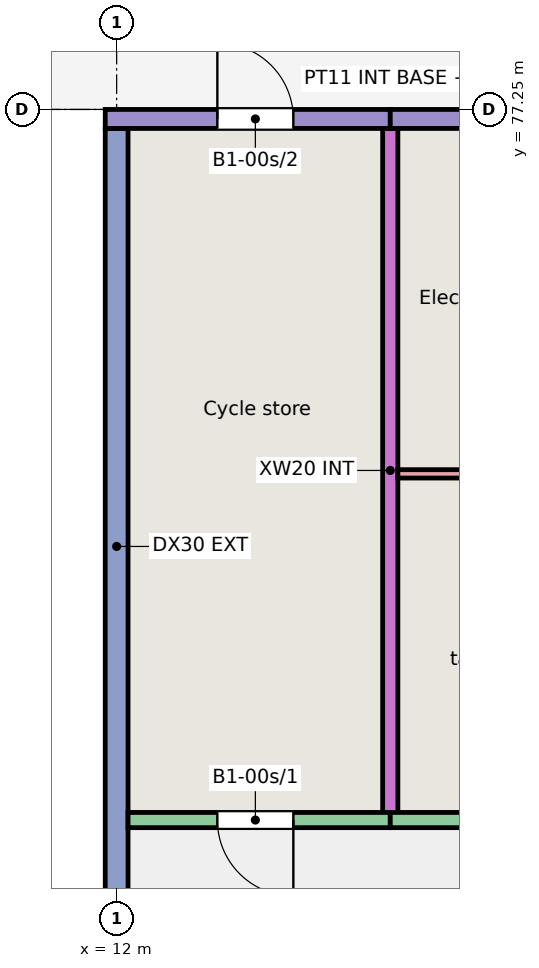
"""IFC4 building model, lengths in metres.
Left out: names, types, materials, properties, quantities, classifications, styles, units other than length and angle.
Written with IfcOpenShell. Run it as: python <this file> out.ifc"""

import sys

from ifc_helpers import new_model, si_unit, direction, frame, frame_2d, origin, place, context, subcontext, project, spatial, rectangle, extrude, element, fill, save


model = new_model("IFC4")
c1 = context("Model", 3, precision=1e-05, world=origin(), true_north=direction((0.0, 1.0)))
c2 = subcontext(c1, "Body", "Model", "MODEL_VIEW")
j1 = project(units=[si_unit("LENGTHUNIT", "METRE"), si_unit("PLANEANGLEUNIT", "RADIAN")], contexts=[c1])
p1 = place(None, origin())
s1 = spatial("IfcSite", under=j1, at=p1, CompositionType="ELEMENT")
p2 = place(p1, origin())
s2 = spatial("IfcBuilding", under=s1, at=p2, CompositionType="ELEMENT")
p3 = place(p2, origin())
s3 = spatial("IfcBuildingStorey", under=s2, at=p3, CompositionType="ELEMENT", Elevation=0.0)
p4 = place(p3, frame((12.0, 66.0, -0.25), z_axis=(0.0, 0.0, 1.0), x_axis=(0.0, 1.0, 0.0)))
e1 = element("IfcWall", 1, at=p4, inside=s3, PredefinedType="SHEAR", context=c2, shape_type="SweptSolid", body=[
    extrude(rectangle(XDim=11.0, YDim=0.3, at=frame_2d((5.5, 0.0))), origin(), (0.0, 0.0, 1.0), 3.25),
])
p5 = place(p3, frame((15.6, 68.0, -0.25), z_axis=(0.0, 0.0, 1.0), x_axis=(0.0, 1.0, 0.0)))
e2 = element("IfcWall", 2, at=p5, inside=s3, PredefinedType="SHEAR", context=c2, shape_type="SweptSolid", body=[
    extrude(rectangle(XDim=9.0, YDim=0.2, at=frame_2d((4.5, 0.0))), origin(), (0.0, 0.0, 1.0), 3.25),
])
p6 = place(p3, frame((11.85, 77.125, -0.25), z_axis=(0.0, 0.0, 1.0), x_axis=(1.0, 0.0, 0.0)))
e3 = element("IfcWall", 3, at=p6, inside=s3, PredefinedType="SOLIDWALL", context=c2, shape_type="SweptSolid", body=[
    extrude(rectangle(XDim=3.75, YDim=0.25, at=frame_2d((1.875, 0.0))), origin(), (0.0, 0.0, 1.0), 3.25),
])
p7 = place(p6, frame((1.475, 0.0, 0.25)))
e4 = element("IfcOpeningElement", 4, at=p7, cuts=e3, PredefinedType="OPENING", context=c2, shape_type="SweptSolid", body=[
    extrude(rectangle(XDim=1.0, YDim=2.1, at=frame_2d((0.5, 1.05))), frame((0.0, 0.135, 0.0), z_axis=(0.0, -1.0, 0.0), x_axis=(1.0, 0.0, 0.0)), (0.0, 0.0, 1.0), 0.27),
])
p8 = place(p3, frame((12.15, 67.9, -0.25), z_axis=(0.0, 0.0, 1.0), x_axis=(1.0, 0.0, 0.0)))
e5 = element("IfcWall", 5, at=p8, inside=s3, PredefinedType="SOLIDWALL", context=c2, shape_type="SweptSolid", body=[
    extrude(rectangle(XDim=3.45, YDim=0.2, at=frame_2d((1.725, 0.0))), origin(), (0.0, 0.0, 1.0), 3.25),
])
p9 = place(p8, frame((1.175, 0.0, 0.25)))
e6 = element("IfcOpeningElement", 6, at=p9, cuts=e5, PredefinedType="OPENING", context=c2, shape_type="SweptSolid", body=[
    extrude(rectangle(XDim=1.0, YDim=2.1, at=frame_2d((0.5, 1.05))), frame((0.0, 0.11, 0.0), z_axis=(0.0, -1.0, 0.0), x_axis=(1.0, 0.0, 0.0)), (0.0, 0.0, 1.0), 0.22),
])
p10 = place(p3, frame((15.6, 77.125, -0.25), z_axis=(0.0, 0.0, 1.0), x_axis=(1.0, 0.0, 0.0)))
e7 = element("IfcWall", 7, at=p10, inside=s3, PredefinedType="SOLIDWALL", context=c2, shape_type="SweptSolid", body=[
    extrude(rectangle(XDim=3.6, YDim=0.25, at=frame_2d((1.8, 0.0))), origin(), (0.0, 0.0, 1.0), 3.25),
])
p11 = place(p3, frame((15.6, 67.9, -0.25), z_axis=(0.0, 0.0, 1.0), x_axis=(1.0, 0.0, 0.0)))
e8 = element("IfcWall", 8, at=p11, inside=s3, PredefinedType="SOLIDWALL", context=c2, shape_type="SweptSolid", body=[
    extrude(rectangle(XDim=3.6, YDim=0.2, at=frame_2d((1.8, 0.0))), origin(), (0.0, 0.0, 1.0), 3.25),
])
p12 = place(p11, frame((1.3, 0.0, 0.25)))
e9 = element("IfcOpeningElement", 9, at=p12, cuts=e8, PredefinedType="OPENING", context=c2, shape_type="SweptSolid", body=[
    extrude(rectangle(XDim=1.0, YDim=2.1, at=frame_2d((0.5, 1.05))), frame((0.0, 0.11, 0.0), z_axis=(0.0, -1.0, 0.0), x_axis=(1.0, 0.0, 0.0)), (0.0, 0.0, 1.0), 0.22),
])
p13 = place(p3, frame((15.7, 72.455, 0.0), z_axis=(0.0, 0.0, 1.0), x_axis=(1.0, 0.0, 0.0)))
e10 = element("IfcWall", 10, at=p13, inside=s3, PredefinedType="PARTITIONING", context=c2, shape_type="SweptSolid", body=[
    extrude(rectangle(XDim=3.4, YDim=0.11, at=frame_2d((1.7, 0.0))), origin(), (0.0, 0.0, 1.0), 2.8),
])
p14 = place(p13, frame((1.25, 0.0, 0.0)))
e11 = element("IfcOpeningElement", 11, at=p14, cuts=e10, PredefinedType="OPENING", context=c2, shape_type="SweptSolid", body=[
    extrude(rectangle(XDim=0.9, YDim=2.1, at=frame_2d((0.45, 1.05))), frame((0.0, 0.065, 0.0), z_axis=(0.0, -1.0, 0.0), x_axis=(1.0, 0.0, 0.0)), (0.0, 0.0, 1.0), 0.13),
])
p15 = place(p9, origin())
e12 = element("IfcDoor", 12, at=p15, inside=s3, OperationType="SINGLE_SWING_RIGHT", PredefinedType="DOOR", context=c2, shape_type="SweptSolid", body=[
    extrude(rectangle(XDim=1.0, YDim=2.1, at=frame_2d((0.5, 1.05))), frame((0.0, 0.025, 0.0), z_axis=(0.0, -1.0, 0.0), x_axis=(1.0, 0.0, 0.0)), (0.0, 0.0, 1.0), 0.05),
])
fill(e6, e12)
p16 = place(p7, origin())
e13 = element("IfcDoor", 13, at=p16, inside=s3, OperationType="SINGLE_SWING_LEFT", PredefinedType="DOOR", context=c2, shape_type="SweptSolid", body=[
    extrude(rectangle(XDim=1.0, YDim=2.1, at=frame_2d((0.5, 1.05))), frame((0.0, 0.025, 0.0), z_axis=(0.0, -1.0, 0.0), x_axis=(1.0, 0.0, 0.0)), (0.0, 0.0, 1.0), 0.05),
])
fill(e4, e13)
save(model, sys.argv[1])
